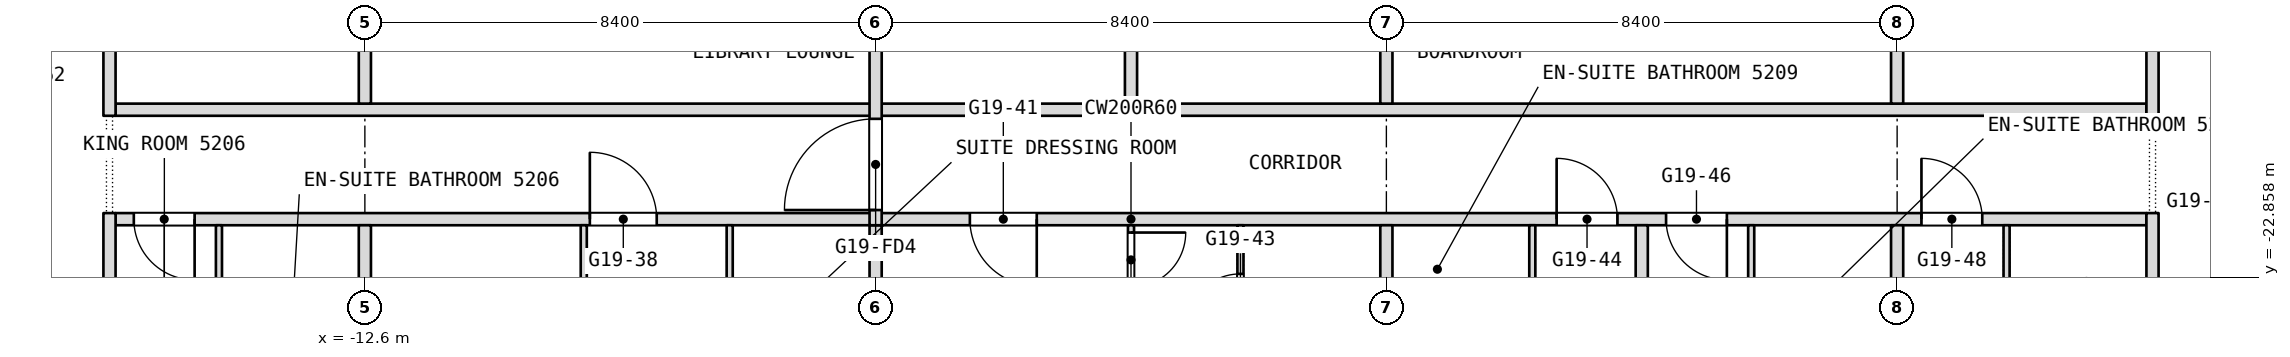
"""IFC4 building model, lengths in metres.
Left out: names, types, materials, properties, quantities, classifications, styles, units other than length and angle.
Written with IfcOpenShell. Run it as: python <this file> out.ifc"""

import sys

from ifc_helpers import new_model, si_unit, direction, frame, frame_2d, origin, place, context, subcontext, project, spatial, rectangle, extrude, element, fill, save


model = new_model("IFC4")
c1 = context("Model", 3, precision=1e-05, world=origin(), true_north=direction((0.0, 1.0)))
c2 = subcontext(c1, "Body", "Model", "MODEL_VIEW")
j1 = project(units=[si_unit("LENGTHUNIT", "METRE"), si_unit("PLANEANGLEUNIT", "RADIAN")], contexts=[c1])
p1 = place(None, origin())
s1 = spatial("IfcSite", under=j1, at=p1, CompositionType="ELEMENT")
p2 = place(p1, origin())
s2 = spatial("IfcBuilding", under=s1, at=p2, CompositionType="ELEMENT")
p3 = place(p2, frame((0.0, 0.0, 223.7)))
s3 = spatial("IfcBuildingStorey", under=s2, at=p3, CompositionType="ELEMENT", Elevation=223.7)
p4 = place(p3, frame((-16.7, -21.9, 0.0), z_axis=(0.0, 0.0, 1.0), x_axis=(1.0, 0.0, 0.0)))
e1 = element("IfcWall", 1, at=p4, inside=s3, PredefinedType="PARTITIONING", context=c2, shape_type="SweptSolid", body=[
    extrude(rectangle(XDim=33.4, YDim=0.2, at=frame_2d((16.7, 0.0))), origin(), (0.0, 0.0, 1.0), 3.34),
])
p5 = place(p4, frame((0.3, 0.0, 0.0)))
e2 = element("IfcOpeningElement", 2, at=p5, cuts=e1, PredefinedType="OPENING", context=c2, shape_type="SweptSolid", body=[
    extrude(rectangle(XDim=1.0, YDim=2.1, at=frame_2d((0.5, 1.05))), frame((0.0, 0.1, 0.0), z_axis=(0.0, -1.0, 0.0), x_axis=(1.0, 0.0, 0.0)), (0.0, 0.0, 1.0), 0.2),
])
p6 = place(p4, frame((7.8, 0.0, 0.0)))
e3 = element("IfcOpeningElement", 3, at=p6, cuts=e1, PredefinedType="OPENING", context=c2, shape_type="SweptSolid", body=[
    extrude(rectangle(XDim=1.1, YDim=2.1, at=frame_2d((0.55, 1.05))), frame((0.0, 0.1, 0.0), z_axis=(0.0, -1.0, 0.0), x_axis=(1.0, 0.0, 0.0)), (0.0, 0.0, 1.0), 0.2),
])
p7 = place(p4, frame((14.05, 0.0, 0.0)))
e4 = element("IfcOpeningElement", 4, at=p7, cuts=e1, PredefinedType="OPENING", context=c2, shape_type="SweptSolid", body=[
    extrude(rectangle(XDim=1.1, YDim=2.1, at=frame_2d((0.55, 1.05))), frame((0.0, 0.1, 0.0), z_axis=(0.0, -1.0, 0.0), x_axis=(1.0, 0.0, 0.0)), (0.0, 0.0, 1.0), 0.2),
])
p8 = place(p4, frame((23.7, 0.0, 0.0)))
e5 = element("IfcOpeningElement", 5, at=p8, cuts=e1, PredefinedType="OPENING", context=c2, shape_type="SweptSolid", body=[
    extrude(rectangle(XDim=1.0, YDim=2.1, at=frame_2d((0.5, 1.05))), frame((0.0, 0.1, 0.0), z_axis=(0.0, -1.0, 0.0), x_axis=(1.0, 0.0, 0.0)), (0.0, 0.0, 1.0), 0.2),
])
p9 = place(p4, frame((25.5, 0.0, 0.0)))
e6 = element("IfcOpeningElement", 6, at=p9, cuts=e1, PredefinedType="OPENING", context=c2, shape_type="SweptSolid", body=[
    extrude(rectangle(XDim=1.0, YDim=2.1, at=frame_2d((0.5, 1.05))), frame((0.0, 0.1, 0.0), z_axis=(0.0, -1.0, 0.0), x_axis=(1.0, 0.0, 0.0)), (0.0, 0.0, 1.0), 0.2),
])
p10 = place(p4, frame((29.7, 0.0, 0.0)))
e7 = element("IfcOpeningElement", 7, at=p10, cuts=e1, PredefinedType="OPENING", context=c2, shape_type="SweptSolid", body=[
    extrude(rectangle(XDim=1.0, YDim=2.1, at=frame_2d((0.5, 1.05))), frame((0.0, 0.1, 0.0), z_axis=(0.0, -1.0, 0.0), x_axis=(1.0, 0.0, 0.0)), (0.0, 0.0, 1.0), 0.2),
])
p11 = place(p3, frame((-16.7, -20.1, 0.0), z_axis=(0.0, 0.0, 1.0), x_axis=(1.0, 0.0, 0.0)))
e8 = element("IfcWall", 8, at=p11, inside=s3, PredefinedType="PARTITIONING", context=c2, shape_type="SweptSolid", body=[
    extrude(rectangle(XDim=33.4, YDim=0.2, at=frame_2d((16.7, 0.0))), origin(), (0.0, 0.0, 1.0), 3.34),
])
p12 = place(p3, frame((16.8, -27.229, 0.0), z_axis=(0.0, 0.0, 1.0), x_axis=(0.0, 1.0, 0.0)))
e9 = element("IfcWall", 9, at=p12, inside=s3, PredefinedType="PARTITIONING", context=c2, shape_type="SweptSolid", body=[
    extrude(rectangle(XDim=5.429, YDim=0.2, at=frame_2d((2.714, 0.0))), origin(), (0.0, 0.0, 1.0), 3.34),
])
p13 = place(p3, frame((16.8, -20.2, 0.0), z_axis=(0.0, 0.0, 1.0), x_axis=(0.0, 1.0, 0.0)))
e10 = element("IfcWall", 10, at=p13, inside=s3, PredefinedType="PARTITIONING", context=c2, shape_type="SweptSolid", body=[
    extrude(rectangle(XDim=6.8, YDim=0.2, at=frame_2d((3.4, 0.0))), origin(), (0.0, 0.0, 1.0), 3.34),
])
p14 = place(p3, frame((14.4, -24.95, 0.0), z_axis=(0.0, 0.0, 1.0), x_axis=(0.0, 1.0, 0.0)))
e11 = element("IfcWall", 11, at=p14, inside=s3, PredefinedType="PARTITIONING", context=c2, shape_type="SweptSolid", body=[
    extrude(rectangle(XDim=2.95, YDim=0.1, at=frame_2d((1.475, 0.0))), origin(), (0.0, 0.0, 1.0), 3.34),
])
p15 = place(p3, frame((12.6, -28.343, 0.0), z_axis=(0.0, 0.0, 1.0), x_axis=(0.0, 1.0, 0.0)))
e12 = element("IfcWall", 12, at=p15, inside=s3, PredefinedType="PARTITIONING", context=c2, shape_type="SweptSolid", body=[
    extrude(rectangle(XDim=6.343, YDim=0.2, at=frame_2d((3.171, 0.0))), origin(), (0.0, 0.0, 1.0), 3.34),
])
p16 = place(p3, frame((12.6, -20.0, 0.0), z_axis=(0.0, 0.0, 1.0), x_axis=(0.0, 1.0, 0.0)))
e13 = element("IfcWall", 13, at=p16, inside=s3, PredefinedType="PARTITIONING", context=c2, shape_type="SweptSolid", body=[
    extrude(rectangle(XDim=1.5, YDim=0.2, at=frame_2d((0.75, 0.0))), origin(), (0.0, 0.0, 1.0), 3.34),
])
p17 = place(p3, frame((10.2, -25.35, 0.0), z_axis=(0.0, 0.0, 1.0), x_axis=(0.0, 1.0, 0.0)))
e14 = element("IfcWall", 14, at=p17, inside=s3, PredefinedType="PARTITIONING", context=c2, shape_type="SweptSolid", body=[
    extrude(rectangle(XDim=3.35, YDim=0.1, at=frame_2d((1.675, 0.0))), origin(), (0.0, 0.0, 1.0), 3.34),
])
p18 = place(p3, frame((8.4, -28.9, 0.0), z_axis=(0.0, 0.0, 1.0), x_axis=(0.0, 1.0, 0.0)))
e15 = element("IfcWall", 15, at=p18, inside=s3, PredefinedType="PARTITIONING", context=c2, shape_type="SweptSolid", body=[
    extrude(rectangle(XDim=6.9, YDim=0.2, at=frame_2d((3.45, 0.0))), origin(), (0.0, 0.0, 1.0), 3.34),
])
p19 = place(p3, frame((6.6, -25.25, 0.0), z_axis=(0.0, 0.0, 1.0), x_axis=(0.0, 1.0, 0.0)))
e16 = element("IfcWall", 16, at=p19, inside=s3, PredefinedType="PARTITIONING", context=c2, shape_type="SweptSolid", body=[
    extrude(rectangle(XDim=3.25, YDim=0.1, at=frame_2d((1.625, 0.0))), origin(), (0.0, 0.0, 1.0), 3.34),
])
p20 = place(p19, frame((1.03, 0.0, 0.0)))
e17 = element("IfcOpeningElement", 17, at=p20, cuts=e16, PredefinedType="OPENING", context=c2, shape_type="SweptSolid", body=[
    extrude(rectangle(XDim=0.9, YDim=2.1, at=frame_2d((0.45, 1.05))), frame((0.0, 0.05, 0.0), z_axis=(0.0, -1.0, 0.0), x_axis=(1.0, 0.0, 0.0)), (0.0, 0.0, 1.0), 0.1),
])
p21 = place(p3, frame((4.2, -28.9, 0.0), z_axis=(0.0, 0.0, 1.0), x_axis=(0.0, 1.0, 0.0)))
e18 = element("IfcWall", 18, at=p21, inside=s3, PredefinedType="PARTITIONING", context=c2, shape_type="SweptSolid", body=[
    extrude(rectangle(XDim=6.9, YDim=0.2, at=frame_2d((3.45, 0.0))), origin(), (0.0, 0.0, 1.0), 3.34),
])
p22 = place(p3, frame((4.2, -20.0, 0.0), z_axis=(0.0, 0.0, 1.0), x_axis=(0.0, 1.0, 0.0)))
e19 = element("IfcWall", 19, at=p22, inside=s3, PredefinedType="PARTITIONING", context=c2, shape_type="SweptSolid", body=[
    extrude(rectangle(XDim=6.4, YDim=0.2, at=frame_2d((3.2, 0.0))), origin(), (0.0, 0.0, 1.0), 3.34),
])
p23 = place(p3, frame((1.8, -24.65, 0.0), z_axis=(0.0, 0.0, 1.0), x_axis=(0.0, 1.0, 0.0)))
e20 = element("IfcWall", 20, at=p23, inside=s3, PredefinedType="PARTITIONING", context=c2, shape_type="SweptSolid", body=[
    extrude(rectangle(XDim=2.65, YDim=0.1, at=frame_2d((1.325, 0.0))), origin(), (0.0, 0.0, 1.0), 3.34),
])
p24 = place(p23, frame((0.95, 0.0, 0.0)))
e21 = element("IfcOpeningElement", 21, at=p24, cuts=e20, PredefinedType="OPENING", context=c2, shape_type="SweptSolid", body=[
    extrude(rectangle(XDim=0.9, YDim=2.1, at=frame_2d((0.45, 1.05))), frame((0.0, 0.05, 0.0), z_axis=(0.0, -1.0, 0.0), x_axis=(1.0, 0.0, 0.0)), (0.0, 0.0, 1.0), 0.1),
])
p25 = place(p3, frame((0.0, -28.9, 0.0), z_axis=(0.0, 0.0, 1.0), x_axis=(0.0, 1.0, 0.0)))
e22 = element("IfcWall", 22, at=p25, inside=s3, PredefinedType="PARTITIONING", context=c2, shape_type="SweptSolid", body=[
    extrude(rectangle(XDim=6.9, YDim=0.1, at=frame_2d((3.45, 0.0))), origin(), (0.0, 0.0, 1.0), 3.34),
])
p26 = place(p25, frame((5.88, 0.0, 0.0)))
e23 = element("IfcOpeningElement", 23, at=p26, cuts=e22, PredefinedType="OPENING", context=c2, shape_type="SweptSolid", body=[
    extrude(rectangle(XDim=0.9, YDim=2.1, at=frame_2d((0.45, 1.05))), frame((0.0, 0.05, 0.0), z_axis=(0.0, -1.0, 0.0), x_axis=(1.0, 0.0, 0.0)), (0.0, 0.0, 1.0), 0.1),
])
p27 = place(p3, frame((0.0, -20.0, 0.0), z_axis=(0.0, 0.0, 1.0), x_axis=(0.0, 1.0, 0.0)))
e24 = element("IfcWall", 24, at=p27, inside=s3, PredefinedType="PARTITIONING", context=c2, shape_type="SweptSolid", body=[
    extrude(rectangle(XDim=6.4, YDim=0.2, at=frame_2d((3.2, 0.0))), origin(), (0.0, 0.0, 1.0), 3.34),
])
p28 = place(p3, frame((-4.2, -28.9, 0.0), z_axis=(0.0, 0.0, 1.0), x_axis=(0.0, 1.0, 0.0)))
e25 = element("IfcWall", 25, at=p28, inside=s3, PredefinedType="PARTITIONING", context=c2, shape_type="SweptSolid", body=[
    extrude(rectangle(XDim=6.9, YDim=0.2, at=frame_2d((3.45, 0.0))), origin(), (0.0, 0.0, 1.0), 3.34),
])
p29 = place(p3, frame((-4.2, -22.0, 0.0), z_axis=(0.0, 0.0, 1.0), x_axis=(0.0, 1.0, 0.0)))
e26 = element("IfcWall", 26, at=p29, inside=s3, PredefinedType="PARTITIONING", context=c2, shape_type="SweptSolid", body=[
    extrude(rectangle(XDim=8.4, YDim=0.2, at=frame_2d((4.2, 0.0))), origin(), (0.0, 0.0, 1.0), 3.34),
])
p30 = place(p29, frame((0.25, 0.0, 0.0)))
e27 = element("IfcOpeningElement", 27, at=p30, cuts=e26, PredefinedType="OPENING", context=c2, shape_type="SweptSolid", body=[
    extrude(rectangle(XDim=1.5, YDim=2.1, at=frame_2d((0.75, 1.05))), frame((0.0, 0.1, 0.0), z_axis=(0.0, -1.0, 0.0), x_axis=(1.0, 0.0, 0.0)), (0.0, 0.0, 1.0), 0.2),
])
p31 = place(p3, frame((-6.6, -25.55, 0.0), z_axis=(0.0, 0.0, 1.0), x_axis=(0.0, 1.0, 0.0)))
e28 = element("IfcWall", 28, at=p31, inside=s3, PredefinedType="PARTITIONING", context=c2, shape_type="SweptSolid", body=[
    extrude(rectangle(XDim=3.55, YDim=0.1, at=frame_2d((1.775, 0.0))), origin(), (0.0, 0.0, 1.0), 3.34),
])
p32 = place(p3, frame((-9.0, -25.45, 0.0), z_axis=(0.0, 0.0, 1.0), x_axis=(0.0, 1.0, 0.0)))
e29 = element("IfcWall", 29, at=p32, inside=s3, PredefinedType="PARTITIONING", context=c2, shape_type="SweptSolid", body=[
    extrude(rectangle(XDim=3.45, YDim=0.1, at=frame_2d((1.725, 0.0))), origin(), (0.0, 0.0, 1.0), 3.34),
])
p33 = place(p32, frame((0.94, 0.0, 0.0)))
e30 = element("IfcOpeningElement", 30, at=p33, cuts=e29, PredefinedType="OPENING", context=c2, shape_type="SweptSolid", body=[
    extrude(rectangle(XDim=0.9, YDim=2.1, at=frame_2d((0.45, 1.05))), frame((0.0, 0.05, 0.0), z_axis=(0.0, -1.0, 0.0), x_axis=(1.0, 0.0, 0.0)), (0.0, 0.0, 1.0), 0.1),
])
p34 = place(p3, frame((-12.6, -28.343, 0.0), z_axis=(0.0, 0.0, 1.0), x_axis=(0.0, 1.0, 0.0)))
e31 = element("IfcWall", 31, at=p34, inside=s3, PredefinedType="PARTITIONING", context=c2, shape_type="SweptSolid", body=[
    extrude(rectangle(XDim=6.343, YDim=0.2, at=frame_2d((3.171, 0.0))), origin(), (0.0, 0.0, 1.0), 3.34),
])
p35 = place(p3, frame((-12.6, -20.0, 0.0), z_axis=(0.0, 0.0, 1.0), x_axis=(0.0, 1.0, 0.0)))
e32 = element("IfcWall", 32, at=p35, inside=s3, PredefinedType="PARTITIONING", context=c2, shape_type="SweptSolid", body=[
    extrude(rectangle(XDim=1.5, YDim=0.2, at=frame_2d((0.75, 0.0))), origin(), (0.0, 0.0, 1.0), 3.34),
])
p36 = place(p3, frame((-15.0, -25.85, 0.0), z_axis=(0.0, 0.0, 1.0), x_axis=(0.0, 1.0, 0.0)))
e33 = element("IfcWall", 33, at=p36, inside=s3, PredefinedType="PARTITIONING", context=c2, shape_type="SweptSolid", body=[
    extrude(rectangle(XDim=3.85, YDim=0.1, at=frame_2d((1.925, 0.0))), origin(), (0.0, 0.0, 1.0), 3.34),
])
p37 = place(p3, frame((-16.8, -27.229, 0.0), z_axis=(0.0, 0.0, 1.0), x_axis=(0.0, 1.0, 0.0)))
e34 = element("IfcWall", 34, at=p37, inside=s3, PredefinedType="PARTITIONING", context=c2, shape_type="SweptSolid", body=[
    extrude(rectangle(XDim=5.429, YDim=0.2, at=frame_2d((2.714, 0.0))), origin(), (0.0, 0.0, 1.0), 3.34),
])
p38 = place(p3, frame((-16.8, -20.2, 0.0), z_axis=(0.0, 0.0, 1.0), x_axis=(0.0, 1.0, 0.0)))
e35 = element("IfcWall", 35, at=p38, inside=s3, PredefinedType="PARTITIONING", context=c2, shape_type="SweptSolid", body=[
    extrude(rectangle(XDim=6.8, YDim=0.2, at=frame_2d((3.4, 0.0))), origin(), (0.0, 0.0, 1.0), 3.34),
])
p39 = place(p5, origin())
e36 = element("IfcDoor", 36, at=p39, inside=s3, OperationType="SINGLE_SWING_RIGHT", PredefinedType="DOOR", context=c2, shape_type="SweptSolid", body=[
    extrude(rectangle(XDim=1.0, YDim=2.1, at=frame_2d((0.5, 1.05))), frame((0.0, 0.025, 0.0), z_axis=(0.0, -1.0, 0.0), x_axis=(1.0, 0.0, 0.0)), (0.0, 0.0, 1.0), 0.05),
])
fill(e2, e36)
p40 = place(p6, origin())
e37 = element("IfcDoor", 37, at=p40, inside=s3, OperationType="SINGLE_SWING_RIGHT", PredefinedType="DOOR", context=c2, shape_type="SweptSolid", body=[
    extrude(rectangle(XDim=1.1, YDim=2.1, at=frame_2d((0.55, 1.05))), frame((0.0, 0.025, 0.0), z_axis=(0.0, -1.0, 0.0), x_axis=(1.0, 0.0, 0.0)), (0.0, 0.0, 1.0), 0.05),
])
fill(e3, e37)
p41 = place(p7, origin())
e38 = element("IfcDoor", 38, at=p41, inside=s3, OperationType="SINGLE_SWING_LEFT", PredefinedType="DOOR", context=c2, shape_type="SweptSolid", body=[
    extrude(rectangle(XDim=1.1, YDim=2.1, at=frame_2d((0.55, 1.05))), frame((0.0, 0.025, 0.0), z_axis=(0.0, -1.0, 0.0), x_axis=(1.0, 0.0, 0.0)), (0.0, 0.0, 1.0), 0.05),
])
fill(e4, e38)
p42 = place(p8, origin())
e39 = element("IfcDoor", 39, at=p42, inside=s3, OperationType="SINGLE_SWING_RIGHT", PredefinedType="DOOR", context=c2, shape_type="SweptSolid", body=[
    extrude(rectangle(XDim=1.0, YDim=2.1, at=frame_2d((0.5, 1.05))), frame((0.0, 0.025, 0.0), z_axis=(0.0, -1.0, 0.0), x_axis=(1.0, 0.0, 0.0)), (0.0, 0.0, 1.0), 0.05),
])
fill(e5, e39)
p43 = place(p9, origin())
e40 = element("IfcDoor", 40, at=p43, inside=s3, OperationType="SINGLE_SWING_RIGHT", PredefinedType="DOOR", context=c2, shape_type="SweptSolid", body=[
    extrude(rectangle(XDim=1.0, YDim=2.1, at=frame_2d((0.5, 1.05))), frame((0.0, 0.025, 0.0), z_axis=(0.0, -1.0, 0.0), x_axis=(1.0, 0.0, 0.0)), (0.0, 0.0, 1.0), 0.05),
])
fill(e6, e40)
p44 = place(p10, origin())
e41 = element("IfcDoor", 41, at=p44, inside=s3, OperationType="SINGLE_SWING_RIGHT", PredefinedType="DOOR", context=c2, shape_type="SweptSolid", body=[
    extrude(rectangle(XDim=1.0, YDim=2.1, at=frame_2d((0.5, 1.05))), frame((0.0, 0.025, 0.0), z_axis=(0.0, -1.0, 0.0), x_axis=(1.0, 0.0, 0.0)), (0.0, 0.0, 1.0), 0.05),
])
fill(e7, e41)
p45 = place(p24, origin())
e42 = element("IfcDoor", 42, at=p45, inside=s3, OperationType="SINGLE_SWING_LEFT", PredefinedType="DOOR", context=c2, shape_type="SweptSolid", body=[
    extrude(rectangle(XDim=0.9, YDim=2.1, at=frame_2d((0.45, 1.05))), frame((0.0, 0.025, 0.0), z_axis=(0.0, -1.0, 0.0), x_axis=(1.0, 0.0, 0.0)), (0.0, 0.0, 1.0), 0.05),
])
fill(e21, e42)
p46 = place(p26, origin())
e43 = element("IfcDoor", 43, at=p46, inside=s3, OperationType="SINGLE_SWING_LEFT", PredefinedType="DOOR", context=c2, shape_type="SweptSolid", body=[
    extrude(rectangle(XDim=0.9, YDim=2.1, at=frame_2d((0.45, 1.05))), frame((0.0, 0.025, 0.0), z_axis=(0.0, -1.0, 0.0), x_axis=(1.0, 0.0, 0.0)), (0.0, 0.0, 1.0), 0.05),
])
fill(e23, e43)
p47 = place(p30, origin())
e44 = element("IfcDoor", 44, at=p47, inside=s3, OperationType="DOUBLE_DOOR_DOUBLE_SWING", PredefinedType="DOOR", context=c2, shape_type="SweptSolid", body=[
    extrude(rectangle(XDim=1.5, YDim=2.1, at=frame_2d((0.75, 1.05))), frame((0.0, 0.025, 0.0), z_axis=(0.0, -1.0, 0.0), x_axis=(1.0, 0.0, 0.0)), (0.0, 0.0, 1.0), 0.05),
])
fill(e27, e44)
save(model, sys.argv[1])
